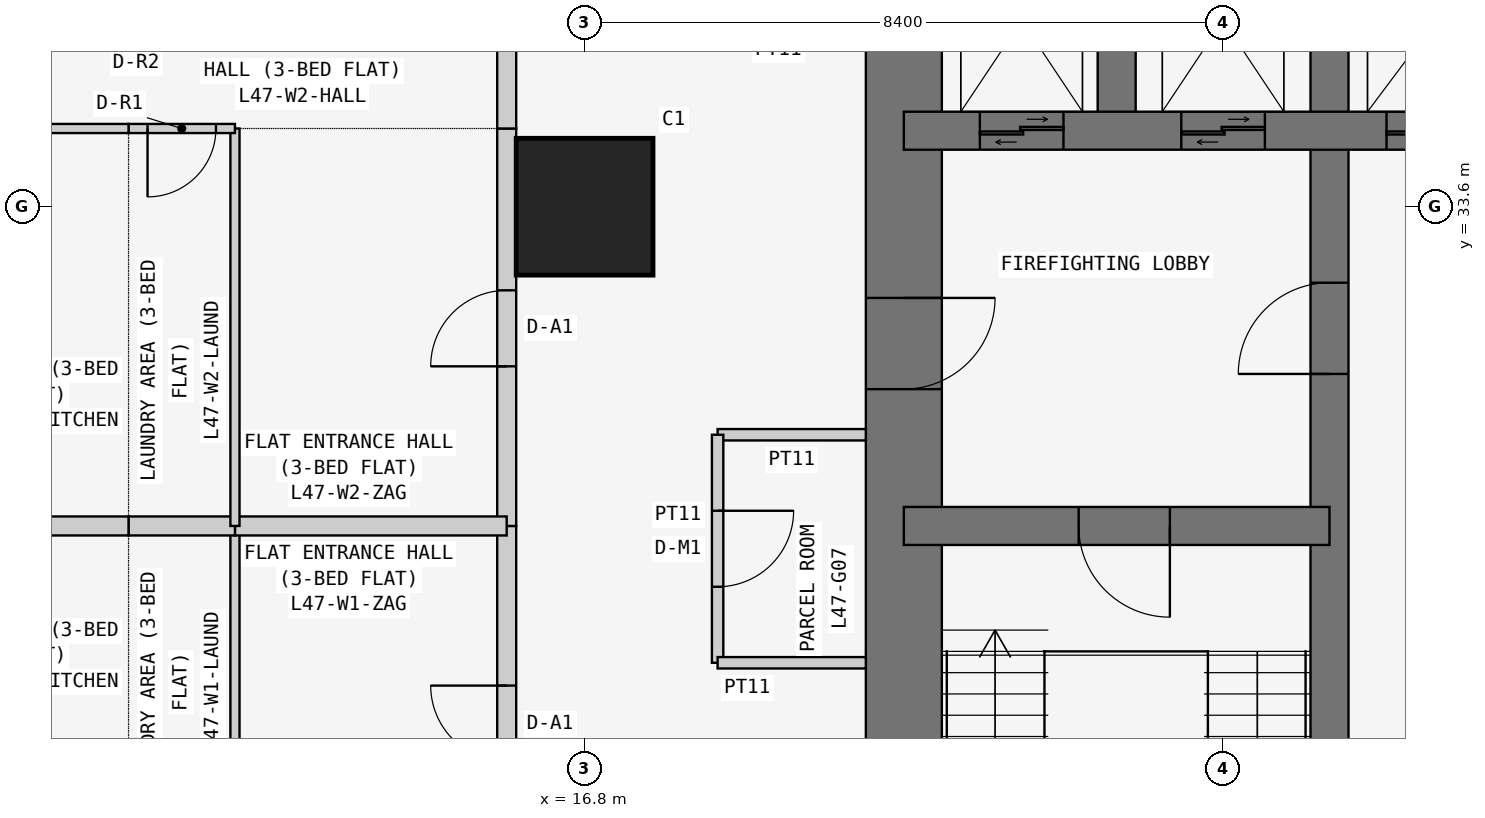
"""IFC4 building model, lengths in metres.
Left out: names, types, materials, properties, quantities, classifications, styles, units other than length and angle.
Written with IfcOpenShell. Run it as: python <this file> out.ifc"""

import sys

from ifc_helpers import new_model, si_unit, direction, frame, frame_2d, origin, origin_2d, place, context, subcontext, project, spatial, rectangle, extrude, element, fill, save


model = new_model("IFC4")
c1 = context("Model", 3, precision=1e-05, world=origin(), true_north=direction((0.0, 1.0)))
c2 = subcontext(c1, "Body", "Model", "MODEL_VIEW")
j1 = project(units=[si_unit("LENGTHUNIT", "METRE"), si_unit("PLANEANGLEUNIT", "RADIAN")], contexts=[c1])
p1 = place(None, origin())
s1 = spatial("IfcSite", under=j1, at=p1, CompositionType="ELEMENT")
p2 = place(p1, origin())
s2 = spatial("IfcBuilding", under=s1, at=p2, CompositionType="ELEMENT")
p3 = place(p2, frame((0.0, 0.0, 183.3)))
s3 = spatial("IfcBuildingStorey", under=s2, at=p3, CompositionType="ELEMENT", Elevation=183.3)
p4 = place(p3, frame((16.8, 33.6, 0.0), z_axis=(0.0, 0.0, 1.0), x_axis=(1.0, 0.0, 0.0)))
e1 = element("IfcColumn", 1, at=p4, inside=s3, PredefinedType="COLUMN", context=c2, shape_type="SweptSolid", body=[
    extrude(rectangle(XDim=1.8, YDim=1.8, at=origin_2d()), origin(), (0.0, 0.0, 1.0), 3.6),
])
p5 = place(p3, frame((21.0, 37.8, 0.0), z_axis=(0.0, 0.0, 1.0), x_axis=(0.0, -1.0, 0.0)))
e2 = element("IfcWall", 2, at=p5, inside=s3, PredefinedType="SHEAR", context=c2, shape_type="SweptSolid", body=[
    extrude(rectangle(XDim=17.3, YDim=1.0, at=frame_2d((8.65, 0.0))), origin(), (0.0, 0.0, 1.0), 3.6),
])
p6 = place(p5, frame((5.4, 0.0, 0.0)))
e3 = element("IfcOpeningElement", 3, at=p6, cuts=e2, PredefinedType="OPENING", context=c2, shape_type="SweptSolid", body=[
    extrude(rectangle(XDim=1.2, YDim=2.1, at=frame_2d((0.6, 1.05))), frame((0.0, 0.51, 0.0), z_axis=(0.0, -1.0, 0.0), x_axis=(1.0, 0.0, 0.0)), (0.0, 0.0, 1.0), 1.02),
])
p7 = place(p3, frame((26.6, 21.0, 0.0), z_axis=(0.0, 0.0, 1.0), x_axis=(0.0, 1.0, 0.0)))
e4 = element("IfcWall", 4, at=p7, inside=s3, PredefinedType="SHEAR", context=c2, shape_type="SweptSolid", body=[
    extrude(rectangle(XDim=16.8, YDim=0.5, at=frame_2d((8.4, 0.0))), origin(), (0.0, 0.0, 1.0), 3.6),
])
p8 = place(p7, frame((10.4, 0.0, 0.0)))
e5 = element("IfcOpeningElement", 5, at=p8, cuts=e4, PredefinedType="OPENING", context=c2, shape_type="SweptSolid", body=[
    extrude(rectangle(XDim=1.2, YDim=2.1, at=frame_2d((0.6, 1.05))), frame((0.0, 0.26, 0.0), z_axis=(0.0, -1.0, 0.0), x_axis=(1.0, 0.0, 0.0)), (0.0, 0.0, 1.0), 0.52),
])
p9 = place(p3, frame((21.0, 29.4, 0.0), z_axis=(0.0, 0.0, 1.0), x_axis=(1.0, 0.0, 0.0)))
e6 = element("IfcWall", 6, at=p9, inside=s3, PredefinedType="SHEAR", context=c2, shape_type="SweptSolid", body=[
    extrude(rectangle(XDim=5.6, YDim=0.5, at=frame_2d((2.8, 0.0))), origin(), (0.0, 0.0, 1.0), 3.6),
])
p10 = place(p9, frame((2.3, 0.0, 0.0)))
e7 = element("IfcOpeningElement", 7, at=p10, cuts=e6, PredefinedType="OPENING", context=c2, shape_type="SweptSolid", body=[
    extrude(rectangle(XDim=1.2, YDim=2.1, at=frame_2d((0.6, 1.05))), frame((0.0, 0.26, 0.0), z_axis=(0.0, -1.0, 0.0), x_axis=(1.0, 0.0, 0.0)), (0.0, 0.0, 1.0), 0.52),
])
p11 = place(p3, frame((21.0, 34.6, 0.0), z_axis=(0.0, 0.0, 1.0), x_axis=(1.0, 0.0, 0.0)))
e8 = element("IfcWall", 8, at=p11, inside=s3, PredefinedType="SHEAR", context=c2, shape_type="SweptSolid", body=[
    extrude(rectangle(XDim=11.2, YDim=0.5, at=frame_2d((5.6, 0.0))), origin(), (0.0, 0.0, 1.0), 3.6),
])
p12 = place(p11, frame((9.25, 0.0, 0.0)))
e9 = element("IfcOpeningElement", 9, at=p12, cuts=e8, PredefinedType="OPENING", context=c2, shape_type="SweptSolid", body=[
    extrude(rectangle(XDim=1.1, YDim=2.1, at=frame_2d((0.55, 1.05))), frame((0.0, 0.26, 0.0), z_axis=(0.0, -1.0, 0.0), x_axis=(1.0, 0.0, 0.0)), (0.0, 0.0, 1.0), 0.52),
])
p13 = place(p11, frame((1.0, 0.0, 0.0)))
e10 = element("IfcOpeningElement", 10, at=p13, cuts=e8, PredefinedType="OPENING", context=c2, shape_type="SweptSolid", body=[
    extrude(rectangle(XDim=1.1, YDim=2.1, at=frame_2d((0.55, 1.05))), frame((0.0, 0.26, 0.0), z_axis=(0.0, -1.0, 0.0), x_axis=(1.0, 0.0, 0.0)), (0.0, 0.0, 1.0), 0.52),
])
p14 = place(p11, frame((3.65, 0.0, 0.0)))
e11 = element("IfcOpeningElement", 11, at=p14, cuts=e8, PredefinedType="OPENING", context=c2, shape_type="SweptSolid", body=[
    extrude(rectangle(XDim=1.1, YDim=2.1, at=frame_2d((0.55, 1.05))), frame((0.0, 0.26, 0.0), z_axis=(0.0, -1.0, 0.0), x_axis=(1.0, 0.0, 0.0)), (0.0, 0.0, 1.0), 0.52),
])
p15 = place(p11, frame((6.35, 0.0, 0.0)))
e12 = element("IfcOpeningElement", 12, at=p15, cuts=e8, PredefinedType="OPENING", context=c2, shape_type="SweptSolid", body=[
    extrude(rectangle(XDim=1.3, YDim=2.1, at=frame_2d((0.65, 1.05))), frame((0.0, 0.26, 0.0), z_axis=(0.0, -1.0, 0.0), x_axis=(1.0, 0.0, 0.0)), (0.0, 0.0, 1.0), 0.52),
])
p16 = place(p3, frame((23.8, 34.6, 0.0), z_axis=(0.0, 0.0, 1.0), x_axis=(0.0, 1.0, 0.0)))
e13 = element("IfcWall", 13, at=p16, inside=s3, PredefinedType="SHEAR", context=c2, shape_type="SweptSolid", body=[
    extrude(rectangle(XDim=3.2, YDim=0.5, at=frame_2d((1.6, 0.0))), origin(), (0.0, 0.0, 1.0), 3.6),
])
p17 = place(p3, frame((20.5, 30.6, 0.0), z_axis=(0.0, 0.0, 1.0), x_axis=(-1.0, 0.0, 0.0)))
e14 = element("IfcWall", 14, at=p17, inside=s3, PredefinedType="PARTITIONING", context=c2, shape_type="SweptSolid", body=[
    extrude(rectangle(XDim=1.95, YDim=0.15, at=frame_2d((0.975, 0.0))), origin(), (0.0, 0.0, 1.0), 3.45),
])
p18 = place(p3, frame((18.55, 30.6, 0.0), z_axis=(0.0, 0.0, 1.0), x_axis=(0.0, -1.0, 0.0)))
e15 = element("IfcWall", 15, at=p18, inside=s3, PredefinedType="PARTITIONING", context=c2, shape_type="SweptSolid", body=[
    extrude(rectangle(XDim=3.0, YDim=0.15, at=frame_2d((1.5, 0.0))), origin(), (0.0, 0.0, 1.0), 3.45),
])
p19 = place(p18, frame((1.0, 0.0, 0.0)))
e16 = element("IfcOpeningElement", 16, at=p19, cuts=e15, PredefinedType="OPENING", context=c2, shape_type="SweptSolid", body=[
    extrude(rectangle(XDim=1.0, YDim=2.1, at=frame_2d((0.5, 1.05))), frame((0.0, 0.085, 0.0), z_axis=(0.0, -1.0, 0.0), x_axis=(1.0, 0.0, 0.0)), (0.0, 0.0, 1.0), 0.17),
])
p20 = place(p3, frame((18.55, 27.6, 0.0), z_axis=(0.0, 0.0, 1.0), x_axis=(1.0, 0.0, 0.0)))
e17 = element("IfcWall", 17, at=p20, inside=s3, PredefinedType="PARTITIONING", context=c2, shape_type="SweptSolid", body=[
    extrude(rectangle(XDim=1.95, YDim=0.15, at=frame_2d((0.975, 0.0))), origin(), (0.0, 0.0, 1.0), 3.45),
])
p21 = place(p3, frame((15.775, 24.171, 0.0), z_axis=(0.0, 0.0, 1.0), x_axis=(0.0, 1.0, 0.0)))
e18 = element("IfcWall", 18, at=p21, inside=s3, PredefinedType="PARTITIONING", context=c2, shape_type="SweptSolid", body=[
    extrude(rectangle(XDim=5.229, YDim=0.25, at=frame_2d((2.615, 0.0))), origin(), (0.0, 0.0, 1.0), 3.45),
])
p22 = place(p21, frame((2.129, 0.0, 0.0)))
e19 = element("IfcOpeningElement", 19, at=p22, cuts=e18, PredefinedType="OPENING", context=c2, shape_type="SweptSolid", body=[
    extrude(rectangle(XDim=1.0, YDim=2.1, at=frame_2d((0.5, 1.05))), frame((0.0, 0.135, 0.0), z_axis=(0.0, -1.0, 0.0), x_axis=(1.0, 0.0, 0.0)), (0.0, 0.0, 1.0), 0.27),
])
p23 = place(p3, frame((15.775, 29.4, 0.0), z_axis=(0.0, 0.0, 1.0), x_axis=(0.0, 1.0, 0.0)))
e20 = element("IfcWall", 20, at=p23, inside=s3, PredefinedType="PARTITIONING", context=c2, shape_type="SweptSolid", body=[
    extrude(rectangle(XDim=5.229, YDim=0.25, at=frame_2d((2.615, 0.0))), origin(), (0.0, 0.0, 1.0), 3.45),
])
p24 = place(p23, frame((2.1, 0.0, 0.0)))
e21 = element("IfcOpeningElement", 21, at=p24, cuts=e20, PredefinedType="OPENING", context=c2, shape_type="SweptSolid", body=[
    extrude(rectangle(XDim=1.0, YDim=2.1, at=frame_2d((0.5, 1.05))), frame((0.0, 0.135, 0.0), z_axis=(0.0, -1.0, 0.0), x_axis=(1.0, 0.0, 0.0)), (0.0, 0.0, 1.0), 0.27),
])
p25 = place(p3, frame((15.775, 34.629, 0.0), z_axis=(0.0, 0.0, 1.0), x_axis=(0.0, 1.0, 0.0)))
e22 = element("IfcWall", 22, at=p25, inside=s3, PredefinedType="PARTITIONING", context=c2, shape_type="SweptSolid", body=[
    extrude(rectangle(XDim=1.2, YDim=0.25, at=frame_2d((0.6, 0.0))), origin(), (0.0, 0.0, 1.0), 3.45),
])
p26 = place(p3, frame((12.2, 29.4, 0.0), z_axis=(0.0, 0.0, 1.0), x_axis=(0.0, -1.0, 0.0)))
e23 = element("IfcWall", 23, at=p26, inside=s3, PredefinedType="PARTITIONING", context=c2, shape_type="SweptSolid", body=[
    extrude(rectangle(XDim=5.229, YDim=0.12, at=frame_2d((2.615, 0.0))), origin(), (0.0, 0.0, 1.0), 3.45),
])
p27 = place(p3, frame((15.775, 29.4, 0.0), z_axis=(0.0, 0.0, 1.0), x_axis=(-1.0, 0.0, 0.0)))
e24 = element("IfcWall", 24, at=p27, inside=s3, PredefinedType="PARTITIONING", context=c2, shape_type="SweptSolid", body=[
    extrude(rectangle(XDim=3.575, YDim=0.25, at=frame_2d((1.788, 0.0))), origin(), (0.0, 0.0, 1.0), 3.45),
])
p28 = place(p3, frame((12.2, 29.4, 0.0), z_axis=(0.0, 0.0, 1.0), x_axis=(-1.0, 0.0, 0.0)))
e25 = element("IfcWall", 25, at=p28, inside=s3, PredefinedType="PARTITIONING", context=c2, shape_type="SweptSolid", body=[
    extrude(rectangle(XDim=1.4, YDim=0.25, at=frame_2d((0.7, 0.0))), origin(), (0.0, 0.0, 1.0), 3.45),
])
p29 = place(p3, frame((10.8, 29.4, 0.0), z_axis=(0.0, 0.0, 1.0), x_axis=(-1.0, 0.0, 0.0)))
e26 = element("IfcWall", 26, at=p29, inside=s3, PredefinedType="PARTITIONING", context=c2, shape_type="SweptSolid", body=[
    extrude(rectangle(XDim=2.4, YDim=0.25, at=frame_2d((1.2, 0.0))), origin(), (0.0, 0.0, 1.0), 3.45),
])
p30 = place(p3, frame((12.2, 29.4, 0.0), z_axis=(0.0, 0.0, 1.0), x_axis=(0.0, 1.0, 0.0)))
e27 = element("IfcWall", 27, at=p30, inside=s3, PredefinedType="PARTITIONING", context=c2, shape_type="SweptSolid", body=[
    extrude(rectangle(XDim=5.229, YDim=0.12, at=frame_2d((2.615, 0.0))), origin(), (0.0, 0.0, 1.0), 3.45),
])
p31 = place(p3, frame((10.8, 34.629, 0.0), z_axis=(0.0, 0.0, 1.0), x_axis=(1.0, 0.0, 0.0)))
e28 = element("IfcWall", 28, at=p31, inside=s3, PredefinedType="PARTITIONING", context=c2, shape_type="SweptSolid", body=[
    extrude(rectangle(XDim=1.4, YDim=0.12, at=frame_2d((0.7, 0.0))), origin(), (0.0, 0.0, 1.0), 3.45),
])
p32 = place(p31, frame((0.25, 0.0, 0.0)))
e29 = element("IfcOpeningElement", 29, at=p32, cuts=e28, PredefinedType="OPENING", context=c2, shape_type="SweptSolid", body=[
    extrude(rectangle(XDim=0.9, YDim=2.1, at=frame_2d((0.45, 1.05))), frame((0.0, 0.07, 0.0), z_axis=(0.0, -1.0, 0.0), x_axis=(1.0, 0.0, 0.0)), (0.0, 0.0, 1.0), 0.14),
])
p33 = place(p3, frame((8.4, 34.629, 0.0), z_axis=(0.0, 0.0, 1.0), x_axis=(1.0, 0.0, 0.0)))
e30 = element("IfcWall", 30, at=p33, inside=s3, PredefinedType="PARTITIONING", context=c2, shape_type="SweptSolid", body=[
    extrude(rectangle(XDim=2.4, YDim=0.12, at=frame_2d((1.2, 0.0))), origin(), (0.0, 0.0, 1.0), 3.45),
])
p34 = place(p19, origin())
e31 = element("IfcDoor", 31, at=p34, inside=s3, OperationType="SINGLE_SWING_LEFT", PredefinedType="DOOR", context=c2, shape_type="SweptSolid", body=[
    extrude(rectangle(XDim=1.0, YDim=2.1, at=frame_2d((0.5, 1.05))), frame((0.0, 0.025, 0.0), z_axis=(0.0, -1.0, 0.0), x_axis=(1.0, 0.0, 0.0)), (0.0, 0.0, 1.0), 0.05),
])
fill(e16, e31)
p35 = place(p22, origin())
e32 = element("IfcDoor", 32, at=p35, inside=s3, OperationType="SINGLE_SWING_RIGHT", PredefinedType="DOOR", context=c2, shape_type="SweptSolid", body=[
    extrude(rectangle(XDim=1.0, YDim=2.1, at=frame_2d((0.5, 1.05))), frame((0.0, 0.025, 0.0), z_axis=(0.0, -1.0, 0.0), x_axis=(1.0, 0.0, 0.0)), (0.0, 0.0, 1.0), 0.05),
])
fill(e19, e32)
p36 = place(p24, origin())
e33 = element("IfcDoor", 33, at=p36, inside=s3, OperationType="SINGLE_SWING_LEFT", PredefinedType="DOOR", context=c2, shape_type="SweptSolid", body=[
    extrude(rectangle(XDim=1.0, YDim=2.1, at=frame_2d((0.5, 1.05))), frame((0.0, 0.025, 0.0), z_axis=(0.0, -1.0, 0.0), x_axis=(1.0, 0.0, 0.0)), (0.0, 0.0, 1.0), 0.05),
])
fill(e21, e33)
p37 = place(p32, frame((0.9, 0.0, 0.0), z_axis=(0.0, 0.0, 1.0), x_axis=(-1.0, 0.0, 0.0)))
e34 = element("IfcDoor", 34, at=p37, inside=s3, OperationType="SINGLE_SWING_RIGHT", PredefinedType="DOOR", context=c2, shape_type="SweptSolid", body=[
    extrude(rectangle(XDim=0.9, YDim=2.1, at=frame_2d((0.45, 1.05))), frame((0.0, 0.025, 0.0), z_axis=(0.0, -1.0, 0.0), x_axis=(1.0, 0.0, 0.0)), (0.0, 0.0, 1.0), 0.05),
])
fill(e29, e34)
p38 = place(p6, origin())
e35 = element("IfcDoor", 35, at=p38, inside=s3, OperationType="SINGLE_SWING_LEFT", PredefinedType="DOOR", context=c2, shape_type="SweptSolid", body=[
    extrude(rectangle(XDim=1.2, YDim=2.1, at=frame_2d((0.6, 1.05))), frame((0.0, 0.025, 0.0), z_axis=(0.0, -1.0, 0.0), x_axis=(1.0, 0.0, 0.0)), (0.0, 0.0, 1.0), 0.05),
])
fill(e3, e35)
p39 = place(p10, frame((1.2, 0.0, 0.0), z_axis=(0.0, 0.0, 1.0), x_axis=(-1.0, 0.0, 0.0)))
e36 = element("IfcDoor", 36, at=p39, inside=s3, OperationType="SINGLE_SWING_LEFT", PredefinedType="DOOR", context=c2, shape_type="SweptSolid", body=[
    extrude(rectangle(XDim=1.2, YDim=2.1, at=frame_2d((0.6, 1.05))), frame((0.0, 0.025, 0.0), z_axis=(0.0, -1.0, 0.0), x_axis=(1.0, 0.0, 0.0)), (0.0, 0.0, 1.0), 0.05),
])
fill(e7, e36)
p40 = place(p8, origin())
e37 = element("IfcDoor", 37, at=p40, inside=s3, OperationType="SINGLE_SWING_LEFT", PredefinedType="DOOR", context=c2, shape_type="SweptSolid", body=[
    extrude(rectangle(XDim=1.2, YDim=2.1, at=frame_2d((0.6, 1.05))), frame((0.0, 0.025, 0.0), z_axis=(0.0, -1.0, 0.0), x_axis=(1.0, 0.0, 0.0)), (0.0, 0.0, 1.0), 0.05),
])
fill(e5, e37)
p41 = place(p13, origin())
e38 = element("IfcDoor", 38, at=p41, inside=s3, OperationType="DOUBLE_DOOR_SLIDING", PredefinedType="DOOR", context=c2, shape_type="SweptSolid", body=[
    extrude(rectangle(XDim=1.1, YDim=2.1, at=frame_2d((0.55, 1.05))), frame((0.0, 0.025, 0.0), z_axis=(0.0, -1.0, 0.0), x_axis=(1.0, 0.0, 0.0)), (0.0, 0.0, 1.0), 0.05),
])
fill(e10, e38)
p42 = place(p14, origin())
e39 = element("IfcDoor", 39, at=p42, inside=s3, OperationType="DOUBLE_DOOR_SLIDING", PredefinedType="DOOR", context=c2, shape_type="SweptSolid", body=[
    extrude(rectangle(XDim=1.1, YDim=2.1, at=frame_2d((0.55, 1.05))), frame((0.0, 0.025, 0.0), z_axis=(0.0, -1.0, 0.0), x_axis=(1.0, 0.0, 0.0)), (0.0, 0.0, 1.0), 0.05),
])
fill(e11, e39)
p43 = place(p15, origin())
e40 = element("IfcDoor", 40, at=p43, inside=s3, OperationType="DOUBLE_DOOR_SLIDING", PredefinedType="DOOR", context=c2, shape_type="SweptSolid", body=[
    extrude(rectangle(XDim=1.3, YDim=2.1, at=frame_2d((0.65, 1.05))), frame((0.0, 0.025, 0.0), z_axis=(0.0, -1.0, 0.0), x_axis=(1.0, 0.0, 0.0)), (0.0, 0.0, 1.0), 0.05),
])
fill(e12, e40)
save(model, sys.argv[1])
